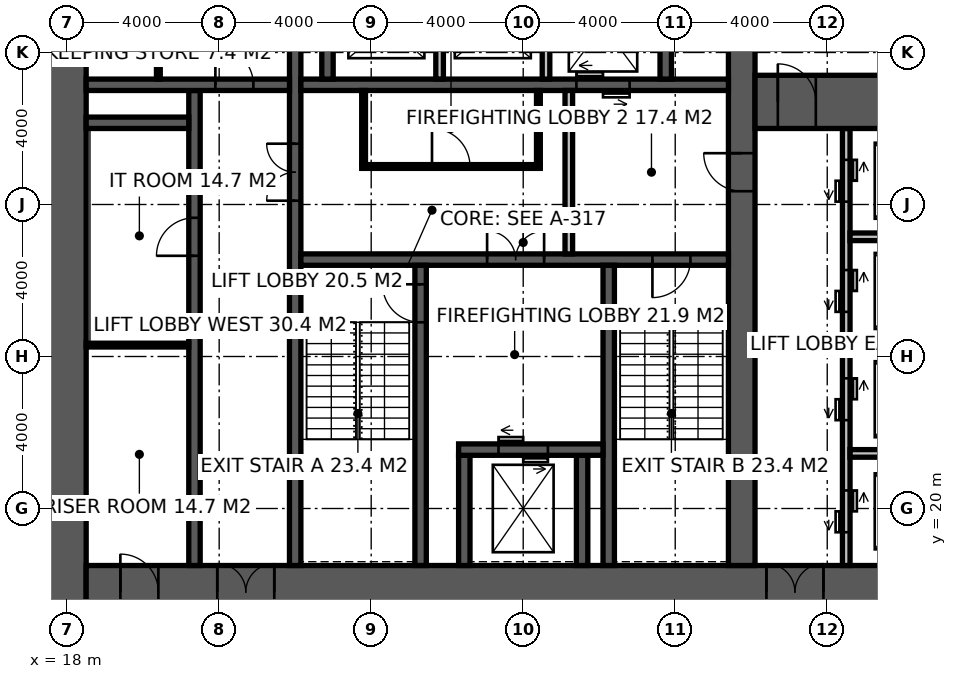
"""IFC4 building model, lengths in metres.
Left out: names, types, materials, properties, quantities, classifications, styles, units other than length and angle.
Written with IfcOpenShell. Run it as: python <this file> out.ifc"""

import sys

from ifc_helpers import new_model, si_unit, direction, frame, frame_2d, origin, place, context, subcontext, project, spatial, rectangle, extrude, element, fill, save


model = new_model("IFC4")
c1 = context("Model", 3, precision=1e-05, world=origin(), true_north=direction((0.0, 1.0)))
c2 = subcontext(c1, "Body", "Model", "MODEL_VIEW")
j1 = project(units=[si_unit("LENGTHUNIT", "METRE"), si_unit("PLANEANGLEUNIT", "RADIAN")], contexts=[c1])
p1 = place(None, origin())
s1 = spatial("IfcSite", under=j1, at=p1, CompositionType="ELEMENT")
p2 = place(p1, origin())
s2 = spatial("IfcBuilding", under=s1, at=p2, CompositionType="ELEMENT")
p3 = place(p2, frame((0.0, 0.0, 63.0)))
s3 = spatial("IfcBuildingStorey", under=s2, at=p3, CompositionType="ELEMENT", Elevation=63.0)
p4 = place(p3, frame((18.0, 17.1, -0.15), z_axis=(0.0, 0.0, 1.0), x_axis=(0.0, 1.0, 0.0)))
e1 = element("IfcWall", 1, at=p4, inside=s3, PredefinedType="SHEAR", context=c2, shape_type="SweptSolid", body=[
    extrude(rectangle(XDim=19.8, YDim=1.0, at=frame_2d((9.9, 0.0))), origin(), (0.0, 0.0, 1.0), 4.0),
])
p5 = place(p3, frame((18.5, 17.8, -0.15), z_axis=(0.0, 0.0, 1.0), x_axis=(1.0, 0.0, 0.0)))
e2 = element("IfcWall", 2, at=p5, inside=s3, PredefinedType="SHEAR", context=c2, shape_type="SweptSolid", body=[
    extrude(rectangle(XDim=23.7, YDim=1.4, at=frame_2d((11.85, 0.0))), origin(), (0.0, 0.0, 1.0), 4.0),
])
p6 = place(p5, frame((3.45, 0.0, 0.15)))
e3 = element("IfcOpeningElement", 3, at=p6, cuts=e2, PredefinedType="OPENING", context=c2, shape_type="SweptSolid", body=[
    extrude(rectangle(XDim=1.5, YDim=2.4, at=frame_2d((0.75, 1.2))), frame((0.0, 0.71, 0.0), z_axis=(0.0, -1.0, 0.0), x_axis=(1.0, 0.0, 0.0)), (0.0, 0.0, 1.0), 1.42),
])
p7 = place(p5, frame((17.9, 0.0, 0.15)))
e4 = element("IfcOpeningElement", 4, at=p7, cuts=e2, PredefinedType="OPENING", context=c2, shape_type="SweptSolid", body=[
    extrude(rectangle(XDim=1.5, YDim=2.4, at=frame_2d((0.75, 1.2))), frame((0.0, 0.71, 0.0), z_axis=(0.0, -1.0, 0.0), x_axis=(1.0, 0.0, 0.0)), (0.0, 0.0, 1.0), 1.42),
])
p8 = place(p5, frame((0.9, 0.0, 0.15)))
e5 = element("IfcOpeningElement", 5, at=p8, cuts=e2, PredefinedType="OPENING", context=c2, shape_type="SweptSolid", body=[
    extrude(rectangle(XDim=1.0, YDim=2.2, at=frame_2d((0.5, 1.1))), frame((0.0, 0.71, 0.0), z_axis=(0.0, -1.0, 0.0), x_axis=(1.0, 0.0, 0.0)), (0.0, 0.0, 1.0), 1.42),
])
p9 = place(p3, frame((35.75, 18.5, -0.15), z_axis=(0.0, 0.0, 1.0), x_axis=(0.0, 1.0, 0.0)))
e6 = element("IfcWall", 6, at=p9, inside=s3, PredefinedType="SHEAR", context=c2, shape_type="SweptSolid", body=[
    extrude(rectangle(XDim=17.0, YDim=0.7, at=frame_2d((8.5, 0.0))), origin(), (0.0, 0.0, 1.0), 4.0),
])
p10 = place(p9, frame((9.85, 0.0, 0.15)))
e7 = element("IfcOpeningElement", 7, at=p10, cuts=e6, PredefinedType="OPENING", context=c2, shape_type="SweptSolid", body=[
    extrude(rectangle(XDim=1.0, YDim=2.2, at=frame_2d((0.5, 1.1))), frame((0.0, 0.36, 0.0), z_axis=(0.0, -1.0, 0.0), x_axis=(1.0, 0.0, 0.0)), (0.0, 0.0, 1.0), 0.72),
])
p11 = place(p3, frame((24.0, 18.5, -0.15), z_axis=(0.0, 0.0, 1.0), x_axis=(0.0, 1.0, 0.0)))
e8 = element("IfcWall", 8, at=p11, inside=s3, PredefinedType="SHEAR", context=c2, shape_type="SweptSolid", body=[
    extrude(rectangle(XDim=17.0, YDim=0.3, at=frame_2d((8.5, 0.0))), origin(), (0.0, 0.0, 1.0), 4.0),
])
p12 = place(p11, frame((9.6, 0.0, 0.15)))
e9 = element("IfcOpeningElement", 9, at=p12, cuts=e8, PredefinedType="OPENING", context=c2, shape_type="SweptSolid", body=[
    extrude(rectangle(XDim=1.5, YDim=2.4, at=frame_2d((0.75, 1.2))), frame((0.0, 0.16, 0.0), z_axis=(0.0, -1.0, 0.0), x_axis=(1.0, 0.0, 0.0)), (0.0, 0.0, 1.0), 0.32),
])
p13 = place(p3, frame((24.15, 26.55, -0.15), z_axis=(0.0, 0.0, 1.0), x_axis=(1.0, 0.0, 0.0)))
e10 = element("IfcWall", 10, at=p13, inside=s3, PredefinedType="SHEAR", context=c2, shape_type="SweptSolid", body=[
    extrude(rectangle(XDim=11.25, YDim=0.3, at=frame_2d((5.625, 0.0))), origin(), (0.0, 0.0, 1.0), 4.0),
])
p14 = place(p13, frame((9.25, 0.0, 0.15)))
e11 = element("IfcOpeningElement", 11, at=p14, cuts=e10, PredefinedType="OPENING", context=c2, shape_type="SweptSolid", body=[
    extrude(rectangle(XDim=1.0, YDim=2.2, at=frame_2d((0.5, 1.1))), frame((0.0, 0.16, 0.0), z_axis=(0.0, -1.0, 0.0), x_axis=(1.0, 0.0, 0.0)), (0.0, 0.0, 1.0), 0.32),
])
p15 = place(p13, frame((4.9, 0.0, 0.15)))
e12 = element("IfcOpeningElement", 12, at=p15, cuts=e10, PredefinedType="OPENING", context=c2, shape_type="SweptSolid", body=[
    extrude(rectangle(XDim=1.5, YDim=2.4, at=frame_2d((0.75, 1.2))), frame((0.0, 0.16, 0.0), z_axis=(0.0, -1.0, 0.0), x_axis=(1.0, 0.0, 0.0)), (0.0, 0.0, 1.0), 0.32),
])
p16 = place(p3, frame((27.3, 18.5, -0.15), z_axis=(0.0, 0.0, 1.0), x_axis=(0.0, 1.0, 0.0)))
e13 = element("IfcWall", 13, at=p16, inside=s3, PredefinedType="SHEAR", context=c2, shape_type="SweptSolid", body=[
    extrude(rectangle(XDim=7.9, YDim=0.3, at=frame_2d((3.95, 0.0))), origin(), (0.0, 0.0, 1.0), 4.0),
])
p17 = place(p16, frame((6.4, 0.0, 0.15)))
e14 = element("IfcOpeningElement", 14, at=p17, cuts=e13, PredefinedType="OPENING", context=c2, shape_type="SweptSolid", body=[
    extrude(rectangle(XDim=1.0, YDim=2.2, at=frame_2d((0.5, 1.1))), frame((0.0, 0.16, 0.0), z_axis=(0.0, -1.0, 0.0), x_axis=(1.0, 0.0, 0.0)), (0.0, 0.0, 1.0), 0.32),
])
p18 = place(p3, frame((32.25, 18.5, -0.15), z_axis=(0.0, 0.0, 1.0), x_axis=(0.0, 1.0, 0.0)))
e15 = element("IfcWall", 15, at=p18, inside=s3, PredefinedType="SHEAR", context=c2, shape_type="SweptSolid", body=[
    extrude(rectangle(XDim=7.9, YDim=0.3, at=frame_2d((3.95, 0.0))), origin(), (0.0, 0.0, 1.0), 4.0),
])
for number, where, z_axis, x_axis in (
    (16, (28.45, 18.5, -0.15), (0.0, 0.0, 1.0), (0.0, 1.0, 0.0)),
    (17, (31.55, 18.5, -0.15), (0.0, 0.0, 1.0), (0.0, 1.0, 0.0)),
):
    element("IfcWall", number, at=place(p3, frame(where, z_axis=z_axis, x_axis=x_axis)), inside=s3, PredefinedType="SHEAR", context=c2, shape_type="SweptSolid", body=[
        extrude(rectangle(XDim=2.9, YDim=0.3, at=frame_2d((1.45, 0.0))), origin(), (0.0, 0.0, 1.0), 4.0),
    ])
p19 = place(p3, frame((28.3, 21.55, -0.15), z_axis=(0.0, 0.0, 1.0), x_axis=(1.0, 0.0, 0.0)))
e18 = element("IfcWall", 18, at=p19, inside=s3, PredefinedType="SHEAR", context=c2, shape_type="SweptSolid", body=[
    extrude(rectangle(XDim=3.8, YDim=0.3, at=frame_2d((1.9, 0.0))), origin(), (0.0, 0.0, 1.0), 4.0),
])
p20 = place(p19, frame((1.05, 0.0, 0.15)))
e19 = element("IfcOpeningElement", 19, at=p20, cuts=e18, PredefinedType="OPENING", context=c2, shape_type="SweptSolid", body=[
    extrude(rectangle(XDim=1.3, YDim=2.4, at=frame_2d((0.65, 1.2))), frame((0.0, 0.16, 0.0), z_axis=(0.0, -1.0, 0.0), x_axis=(1.0, 0.0, 0.0)), (0.0, 0.0, 1.0), 0.32),
])
p21 = place(p3, frame((24.15, 31.15, -0.15), z_axis=(0.0, 0.0, 1.0), x_axis=(1.0, 0.0, 0.0)))
e20 = element("IfcWall", 20, at=p21, inside=s3, PredefinedType="SHEAR", context=c2, shape_type="SweptSolid", body=[
    extrude(rectangle(XDim=11.25, YDim=0.3, at=frame_2d((5.625, 0.0))), origin(), (0.0, 0.0, 1.0), 4.0),
])
p22 = place(p21, frame((7.25, 0.0, 0.15)))
e21 = element("IfcOpeningElement", 21, at=p22, cuts=e20, PredefinedType="OPENING", context=c2, shape_type="SweptSolid", body=[
    extrude(rectangle(XDim=1.4, YDim=2.4, at=frame_2d((0.7, 1.2))), frame((0.0, 0.16, 0.0), z_axis=(0.0, -1.0, 0.0), x_axis=(1.0, 0.0, 0.0)), (0.0, 0.0, 1.0), 0.32),
])
p23 = place(p3, frame((21.35, 18.5, -0.15), z_axis=(0.0, 0.0, 1.0), x_axis=(0.0, 1.0, 0.0)))
e22 = element("IfcWall", 22, at=p23, inside=s3, PredefinedType="SHEAR", context=c2, shape_type="SweptSolid", body=[
    extrude(rectangle(XDim=12.5, YDim=0.3, at=frame_2d((6.25, 0.0))), origin(), (0.0, 0.0, 1.0), 4.0),
])
p24 = place(p23, frame((8.15, 0.0, 0.15)))
e23 = element("IfcOpeningElement", 23, at=p24, cuts=e22, PredefinedType="OPENING", context=c2, shape_type="SweptSolid", body=[
    extrude(rectangle(XDim=1.0, YDim=2.2, at=frame_2d((0.5, 1.1))), frame((0.0, 0.16, 0.0), z_axis=(0.0, -1.0, 0.0), x_axis=(1.0, 0.0, 0.0)), (0.0, 0.0, 1.0), 0.32),
])
p25 = place(p3, frame((18.5, 31.15, -0.15), z_axis=(0.0, 0.0, 1.0), x_axis=(1.0, 0.0, 0.0)))
e24 = element("IfcWall", 24, at=p25, inside=s3, PredefinedType="SHEAR", context=c2, shape_type="SweptSolid", body=[
    extrude(rectangle(XDim=5.35, YDim=0.3, at=frame_2d((2.675, 0.0))), origin(), (0.0, 0.0, 1.0), 4.0),
])
p26 = place(p25, frame((3.4, 0.0, 0.15)))
e25 = element("IfcOpeningElement", 25, at=p26, cuts=e24, PredefinedType="OPENING", context=c2, shape_type="SweptSolid", body=[
    extrude(rectangle(XDim=1.0, YDim=2.2, at=frame_2d((0.5, 1.1))), frame((0.0, 0.16, 0.0), z_axis=(0.0, -1.0, 0.0), x_axis=(1.0, 0.0, 0.0)), (0.0, 0.0, 1.0), 0.32),
])
p27 = place(p3, frame((18.5, 30.15, -0.15), z_axis=(0.0, 0.0, 1.0), x_axis=(1.0, 0.0, 0.0)))
e26 = element("IfcWall", 26, at=p27, inside=s3, PredefinedType="SHEAR", context=c2, shape_type="SweptSolid", body=[
    extrude(rectangle(XDim=2.7, YDim=0.3, at=frame_2d((1.35, 0.0))), origin(), (0.0, 0.0, 1.0), 4.0),
])
for number, where, z_axis, x_axis in (
    (27, (24.85, 31.3, -0.15), (0.0, 0.0, 1.0), (0.0, 1.0, 0.0)),
    (28, (33.75, 31.3, -0.15), (0.0, 0.0, 1.0), (0.0, 1.0, 0.0)),
):
    element("IfcWall", number, at=place(p3, frame(where, z_axis=z_axis, x_axis=x_axis)), inside=s3, PredefinedType="SHEAR", context=c2, shape_type="SweptSolid", body=[
        extrude(rectangle(XDim=4.2, YDim=0.3, at=frame_2d((2.1, 0.0))), origin(), (0.0, 0.0, 1.0), 4.0),
    ])
for number, where, z_axis, x_axis in (
    (29, (27.8, 31.3, -0.15), (0.0, 0.0, 1.0), (0.0, 1.0, 0.0)),
    (30, (30.6, 31.3, -0.15), (0.0, 0.0, 1.0), (0.0, 1.0, 0.0)),
):
    element("IfcWall", number, at=place(p3, frame(where, z_axis=z_axis, x_axis=x_axis)), inside=s3, PredefinedType="SOLIDWALL", context=c2, shape_type="SweptSolid", body=[
        extrude(rectangle(XDim=2.8, YDim=0.2, at=frame_2d((1.4, 0.0))), origin(), (0.0, 0.0, 1.0), 4.0),
    ])
p28 = place(p3, frame((38.5, 18.5, -0.15), z_axis=(0.0, 0.0, 1.0), x_axis=(0.0, 1.0, 0.0)))
e31 = element("IfcWall", 31, at=p28, inside=s3, PredefinedType="SOLIDWALL", context=c2, shape_type="SweptSolid", body=[
    extrude(rectangle(XDim=11.5, YDim=0.2, at=frame_2d((5.75, 0.0))), origin(), (0.0, 0.0, 1.0), 4.0),
])
p29 = place(p28, frame((0.875, 0.0, 0.15)))
e32 = element("IfcOpeningElement", 32, at=p29, cuts=e31, PredefinedType="OPENING", context=c2, shape_type="SweptSolid", body=[
    extrude(rectangle(XDim=1.1, YDim=2.2, at=frame_2d((0.55, 1.1))), frame((0.0, 0.11, 0.0), z_axis=(0.0, -1.0, 0.0), x_axis=(1.0, 0.0, 0.0)), (0.0, 0.0, 1.0), 0.22),
])
p30 = place(p28, frame((3.825, 0.0, 0.15)))
e33 = element("IfcOpeningElement", 33, at=p30, cuts=e31, PredefinedType="OPENING", context=c2, shape_type="SweptSolid", body=[
    extrude(rectangle(XDim=1.1, YDim=2.2, at=frame_2d((0.55, 1.1))), frame((0.0, 0.11, 0.0), z_axis=(0.0, -1.0, 0.0), x_axis=(1.0, 0.0, 0.0)), (0.0, 0.0, 1.0), 0.22),
])
p31 = place(p28, frame((6.675, 0.0, 0.15)))
e34 = element("IfcOpeningElement", 34, at=p31, cuts=e31, PredefinedType="OPENING", context=c2, shape_type="SweptSolid", body=[
    extrude(rectangle(XDim=1.1, YDim=2.2, at=frame_2d((0.55, 1.1))), frame((0.0, 0.11, 0.0), z_axis=(0.0, -1.0, 0.0), x_axis=(1.0, 0.0, 0.0)), (0.0, 0.0, 1.0), 0.22),
])
p32 = place(p28, frame((9.575, 0.0, 0.15)))
e35 = element("IfcOpeningElement", 35, at=p32, cuts=e31, PredefinedType="OPENING", context=c2, shape_type="SweptSolid", body=[
    extrude(rectangle(XDim=1.1, YDim=2.2, at=frame_2d((0.55, 1.1))), frame((0.0, 0.11, 0.0), z_axis=(0.0, -1.0, 0.0), x_axis=(1.0, 0.0, 0.0)), (0.0, 0.0, 1.0), 0.22),
])
p33 = place(p3, frame((36.1, 30.7, -0.15), z_axis=(0.0, 0.0, 1.0), x_axis=(1.0, 0.0, 0.0)))
e36 = element("IfcWall", 36, at=p33, inside=s3, PredefinedType="SHEAR", context=c2, shape_type="SweptSolid", body=[
    extrude(rectangle(XDim=6.1, YDim=1.4, at=frame_2d((3.05, 0.0))), origin(), (0.0, 0.0, 1.0), 4.0),
])
p34 = place(p33, frame((0.6, 0.0, 0.15)))
e37 = element("IfcOpeningElement", 37, at=p34, cuts=e36, PredefinedType="OPENING", context=c2, shape_type="SweptSolid", body=[
    extrude(rectangle(XDim=1.0, YDim=2.2, at=frame_2d((0.5, 1.1))), frame((0.0, 0.71, 0.0), z_axis=(0.0, -1.0, 0.0), x_axis=(1.0, 0.0, 0.0)), (0.0, 0.0, 1.0), 1.42),
])
for number, where, z_axis, x_axis in (
    (38, (38.6, 21.45, -0.15), (0.0, 0.0, 1.0), (1.0, 0.0, 0.0)),
    (39, (38.6, 24.3, -0.15), (0.0, 0.0, 1.0), (1.0, 0.0, 0.0)),
    (40, (38.6, 27.15, -0.15), (0.0, 0.0, 1.0), (1.0, 0.0, 0.0)),
):
    element("IfcWall", number, at=place(p3, frame(where, z_axis=z_axis, x_axis=x_axis)), inside=s3, PredefinedType="SOLIDWALL", context=c2, shape_type="SweptSolid", body=[
        extrude(rectangle(XDim=2.9, YDim=0.2, at=frame_2d((1.45, 0.0))), origin(), (0.0, 0.0, 1.0), 4.0),
    ])
p35 = place(p3, frame((31.2, 26.7, 0.0), z_axis=(0.0, 0.0, 1.0), x_axis=(0.0, 1.0, 0.0)))
e41 = element("IfcWall", 41, at=p35, inside=s3, PredefinedType="SOLIDWALL", context=c2, shape_type="SweptSolid", body=[
    extrude(rectangle(XDim=4.3, YDim=0.2, at=frame_2d((2.15, 0.0))), origin(), (0.0, 0.0, 1.0), 3.85),
])
p36 = place(p3, frame((20.4, 31.3, 0.0), z_axis=(0.0, 0.0, 1.0), x_axis=(0.0, 1.0, 0.0)))
e42 = element("IfcWall", 42, at=p36, inside=s3, PredefinedType="PARTITIONING", context=c2, shape_type="SweptSolid", body=[
    extrude(rectangle(XDim=4.2, YDim=0.1, at=frame_2d((2.1, 0.0))), origin(), (0.0, 0.0, 1.0), 3.85),
])
p37 = place(p36, frame((1.55, 0.0, 0.0)))
e43 = element("IfcOpeningElement", 43, at=p37, cuts=e42, PredefinedType="OPENING", context=c2, shape_type="SweptSolid", body=[
    extrude(rectangle(XDim=1.0, YDim=2.2, at=frame_2d((0.5, 1.1))), frame((0.0, 0.06, 0.0), z_axis=(0.0, -1.0, 0.0), x_axis=(1.0, 0.0, 0.0)), (0.0, 0.0, 1.0), 0.12),
])
p38 = place(p3, frame((25.75, 29.0, 0.0), z_axis=(0.0, 0.0, 1.0), x_axis=(1.0, 0.0, 0.0)))
e44 = element("IfcWall", 44, at=p38, inside=s3, PredefinedType="PARTITIONING", context=c2, shape_type="SweptSolid", body=[
    extrude(rectangle(XDim=4.7, YDim=0.1, at=frame_2d((2.35, 0.0))), origin(), (0.0, 0.0, 1.0), 3.85),
])
p39 = place(p38, frame((1.85, 0.0, 0.0)))
e45 = element("IfcOpeningElement", 45, at=p39, cuts=e44, PredefinedType="OPENING", context=c2, shape_type="SweptSolid", body=[
    extrude(rectangle(XDim=1.0, YDim=2.2, at=frame_2d((0.5, 1.1))), frame((0.0, 0.06, 0.0), z_axis=(0.0, -1.0, 0.0), x_axis=(1.0, 0.0, 0.0)), (0.0, 0.0, 1.0), 0.12),
])
for number, where, z_axis, x_axis in (
    (46, (25.8, 29.05, 0.0), (0.0, 0.0, 1.0), (0.0, 1.0, 0.0)),
    (47, (30.4, 29.05, 0.0), (0.0, 0.0, 1.0), (0.0, 1.0, 0.0)),
):
    element("IfcWall", number, at=place(p3, frame(where, z_axis=z_axis, x_axis=x_axis)), inside=s3, PredefinedType="PARTITIONING", context=c2, shape_type="SweptSolid", body=[
        extrude(rectangle(XDim=1.95, YDim=0.1, at=frame_2d((0.975, 0.0))), origin(), (0.0, 0.0, 1.0), 3.85),
    ])
p40 = place(p3, frame((18.5, 24.3, 0.0), z_axis=(0.0, 0.0, 1.0), x_axis=(1.0, 0.0, 0.0)))
e48 = element("IfcWall", 48, at=p40, inside=s3, PredefinedType="PARTITIONING", context=c2, shape_type="SweptSolid", body=[
    extrude(rectangle(XDim=2.7, YDim=0.1, at=frame_2d((1.35, 0.0))), origin(), (0.0, 0.0, 1.0), 3.85),
])
p41 = place(p17, origin())
e49 = element("IfcDoor", 49, at=p41, inside=s3, OperationType="SINGLE_SWING_RIGHT", PredefinedType="DOOR", context=c2, shape_type="SweptSolid", body=[
    extrude(rectangle(XDim=1.0, YDim=2.2, at=frame_2d((0.5, 1.1))), frame((0.0, 0.025, 0.0), z_axis=(0.0, -1.0, 0.0), x_axis=(1.0, 0.0, 0.0)), (0.0, 0.0, 1.0), 0.05),
])
fill(e14, e49)
p42 = place(p14, frame((1.0, 0.0, 0.0), z_axis=(0.0, 0.0, 1.0), x_axis=(-1.0, 0.0, 0.0)))
e50 = element("IfcDoor", 50, at=p42, inside=s3, OperationType="SINGLE_SWING_RIGHT", PredefinedType="DOOR", context=c2, shape_type="SweptSolid", body=[
    extrude(rectangle(XDim=1.0, YDim=2.2, at=frame_2d((0.5, 1.1))), frame((0.0, 0.025, 0.0), z_axis=(0.0, -1.0, 0.0), x_axis=(1.0, 0.0, 0.0)), (0.0, 0.0, 1.0), 0.05),
])
fill(e11, e50)
p43 = place(p10, origin())
e51 = element("IfcDoor", 51, at=p43, inside=s3, OperationType="SINGLE_SWING_RIGHT", PredefinedType="DOOR", context=c2, shape_type="SweptSolid", body=[
    extrude(rectangle(XDim=1.0, YDim=2.2, at=frame_2d((0.5, 1.1))), frame((0.0, 0.025, 0.0), z_axis=(0.0, -1.0, 0.0), x_axis=(1.0, 0.0, 0.0)), (0.0, 0.0, 1.0), 0.05),
])
fill(e7, e51)
p44 = place(p15, origin())
e52 = element("IfcDoor", 52, at=p44, inside=s3, OperationType="DOUBLE_DOOR_DOUBLE_SWING", PredefinedType="DOOR", context=c2, shape_type="SweptSolid", body=[
    extrude(rectangle(XDim=1.5, YDim=2.4, at=frame_2d((0.75, 1.2))), frame((0.0, 0.025, 0.0), z_axis=(0.0, -1.0, 0.0), x_axis=(1.0, 0.0, 0.0)), (0.0, 0.0, 1.0), 0.05),
])
fill(e12, e52)
p45 = place(p12, origin())
e53 = element("IfcDoor", 53, at=p45, inside=s3, OperationType="DOUBLE_DOOR_DOUBLE_SWING", PredefinedType="DOOR", context=c2, shape_type="SweptSolid", body=[
    extrude(rectangle(XDim=1.5, YDim=2.4, at=frame_2d((0.75, 1.2))), frame((0.0, 0.025, 0.0), z_axis=(0.0, -1.0, 0.0), x_axis=(1.0, 0.0, 0.0)), (0.0, 0.0, 1.0), 0.05),
])
fill(e9, e53)
p46 = place(p26, origin())
e54 = element("IfcDoor", 54, at=p46, inside=s3, OperationType="SINGLE_SWING_LEFT", PredefinedType="DOOR", context=c2, shape_type="SweptSolid", body=[
    extrude(rectangle(XDim=1.0, YDim=2.2, at=frame_2d((0.5, 1.1))), frame((0.0, 0.025, 0.0), z_axis=(0.0, -1.0, 0.0), x_axis=(1.0, 0.0, 0.0)), (0.0, 0.0, 1.0), 0.05),
])
fill(e25, e54)
p47 = place(p39, origin())
e55 = element("IfcDoor", 55, at=p47, inside=s3, OperationType="SINGLE_SWING_LEFT", PredefinedType="DOOR", context=c2, shape_type="SweptSolid", body=[
    extrude(rectangle(XDim=1.0, YDim=2.2, at=frame_2d((0.5, 1.1))), frame((0.0, 0.025, 0.0), z_axis=(0.0, -1.0, 0.0), x_axis=(1.0, 0.0, 0.0)), (0.0, 0.0, 1.0), 0.05),
])
fill(e45, e55)
p48 = place(p24, origin())
e56 = element("IfcDoor", 56, at=p48, inside=s3, OperationType="SINGLE_SWING_LEFT", PredefinedType="DOOR", context=c2, shape_type="SweptSolid", body=[
    extrude(rectangle(XDim=1.0, YDim=2.2, at=frame_2d((0.5, 1.1))), frame((0.0, 0.025, 0.0), z_axis=(0.0, -1.0, 0.0), x_axis=(1.0, 0.0, 0.0)), (0.0, 0.0, 1.0), 0.05),
])
fill(e23, e56)
p49 = place(p6, origin())
e57 = element("IfcDoor", 57, at=p49, inside=s3, OperationType="DOUBLE_DOOR_DOUBLE_SWING", PredefinedType="DOOR", context=c2, shape_type="SweptSolid", body=[
    extrude(rectangle(XDim=1.5, YDim=2.4, at=frame_2d((0.75, 1.2))), frame((0.0, 0.025, 0.0), z_axis=(0.0, -1.0, 0.0), x_axis=(1.0, 0.0, 0.0)), (0.0, 0.0, 1.0), 0.05),
])
fill(e3, e57)
p50 = place(p7, origin())
e58 = element("IfcDoor", 58, at=p50, inside=s3, OperationType="DOUBLE_DOOR_DOUBLE_SWING", PredefinedType="DOOR", context=c2, shape_type="SweptSolid", body=[
    extrude(rectangle(XDim=1.5, YDim=2.4, at=frame_2d((0.75, 1.2))), frame((0.0, 0.025, 0.0), z_axis=(0.0, -1.0, 0.0), x_axis=(1.0, 0.0, 0.0)), (0.0, 0.0, 1.0), 0.05),
])
fill(e4, e58)
p51 = place(p34, origin())
e59 = element("IfcDoor", 59, at=p51, inside=s3, OperationType="SINGLE_SWING_LEFT", PredefinedType="DOOR", context=c2, shape_type="SweptSolid", body=[
    extrude(rectangle(XDim=1.0, YDim=2.2, at=frame_2d((0.5, 1.1))), frame((0.0, 0.025, 0.0), z_axis=(0.0, -1.0, 0.0), x_axis=(1.0, 0.0, 0.0)), (0.0, 0.0, 1.0), 0.05),
])
fill(e37, e59)
p52 = place(p8, origin())
e60 = element("IfcDoor", 60, at=p52, inside=s3, OperationType="SINGLE_SWING_LEFT", PredefinedType="DOOR", context=c2, shape_type="SweptSolid", body=[
    extrude(rectangle(XDim=1.0, YDim=2.2, at=frame_2d((0.5, 1.1))), frame((0.0, 0.025, 0.0), z_axis=(0.0, -1.0, 0.0), x_axis=(1.0, 0.0, 0.0)), (0.0, 0.0, 1.0), 0.05),
])
fill(e5, e60)
p53 = place(p20, origin())
e61 = element("IfcDoor", 61, at=p53, inside=s3, OperationType="DOUBLE_DOOR_SLIDING", PredefinedType="DOOR", context=c2, shape_type="SweptSolid", body=[
    extrude(rectangle(XDim=1.3, YDim=2.4, at=frame_2d((0.65, 1.2))), frame((0.0, 0.025, 0.0), z_axis=(0.0, -1.0, 0.0), x_axis=(1.0, 0.0, 0.0)), (0.0, 0.0, 1.0), 0.05),
])
fill(e19, e61)
p54 = place(p22, origin())
e62 = element("IfcDoor", 62, at=p54, inside=s3, OperationType="DOUBLE_DOOR_SLIDING", PredefinedType="DOOR", context=c2, shape_type="SweptSolid", body=[
    extrude(rectangle(XDim=1.4, YDim=2.4, at=frame_2d((0.7, 1.2))), frame((0.0, 0.025, 0.0), z_axis=(0.0, -1.0, 0.0), x_axis=(1.0, 0.0, 0.0)), (0.0, 0.0, 1.0), 0.05),
])
fill(e21, e62)
p55 = place(p29, origin())
e63 = element("IfcDoor", 63, at=p55, inside=s3, OperationType="DOUBLE_DOOR_SLIDING", PredefinedType="DOOR", context=c2, shape_type="SweptSolid", body=[
    extrude(rectangle(XDim=1.1, YDim=2.2, at=frame_2d((0.55, 1.1))), frame((0.0, 0.025, 0.0), z_axis=(0.0, -1.0, 0.0), x_axis=(1.0, 0.0, 0.0)), (0.0, 0.0, 1.0), 0.05),
])
fill(e32, e63)
p56 = place(p30, origin())
e64 = element("IfcDoor", 64, at=p56, inside=s3, OperationType="DOUBLE_DOOR_SLIDING", PredefinedType="DOOR", context=c2, shape_type="SweptSolid", body=[
    extrude(rectangle(XDim=1.1, YDim=2.2, at=frame_2d((0.55, 1.1))), frame((0.0, 0.025, 0.0), z_axis=(0.0, -1.0, 0.0), x_axis=(1.0, 0.0, 0.0)), (0.0, 0.0, 1.0), 0.05),
])
fill(e33, e64)
p57 = place(p31, origin())
e65 = element("IfcDoor", 65, at=p57, inside=s3, OperationType="DOUBLE_DOOR_SLIDING", PredefinedType="DOOR", context=c2, shape_type="SweptSolid", body=[
    extrude(rectangle(XDim=1.1, YDim=2.2, at=frame_2d((0.55, 1.1))), frame((0.0, 0.025, 0.0), z_axis=(0.0, -1.0, 0.0), x_axis=(1.0, 0.0, 0.0)), (0.0, 0.0, 1.0), 0.05),
])
fill(e34, e65)
p58 = place(p32, origin())
e66 = element("IfcDoor", 66, at=p58, inside=s3, OperationType="DOUBLE_DOOR_SLIDING", PredefinedType="DOOR", context=c2, shape_type="SweptSolid", body=[
    extrude(rectangle(XDim=1.1, YDim=2.2, at=frame_2d((0.55, 1.1))), frame((0.0, 0.025, 0.0), z_axis=(0.0, -1.0, 0.0), x_axis=(1.0, 0.0, 0.0)), (0.0, 0.0, 1.0), 0.05),
])
fill(e35, e66)
save(model, sys.argv[1])
